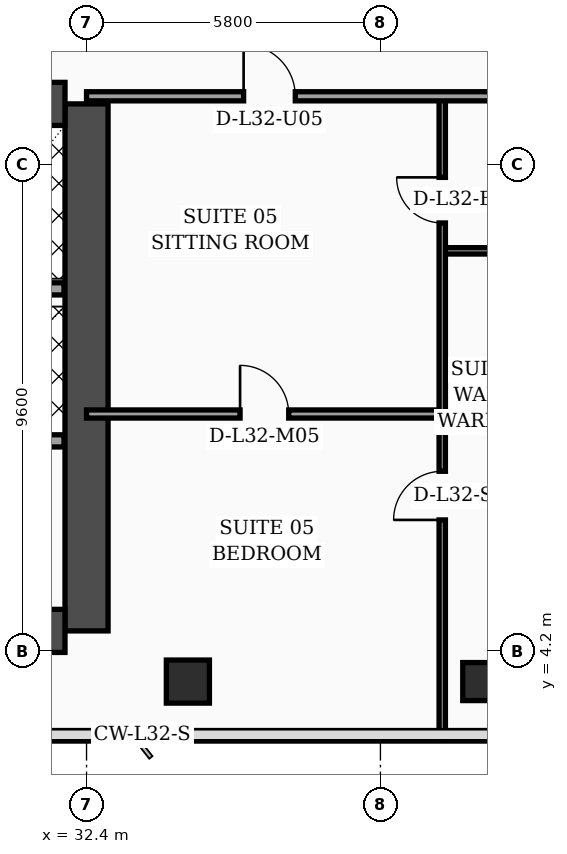
"""IFC4 building model, lengths in metres.
Left out: names, types, materials, properties, quantities, classifications, styles, units other than length and angle.
Written with IfcOpenShell. Run it as: python <this file> out.ifc"""

import sys

from ifc_helpers import new_model, si_unit, direction, frame, frame_2d, origin, origin_2d, place, context, subcontext, project, spatial, rectangle, hollow_rectangle, extrude, element, fill, save


model = new_model("IFC4")
c1 = context("Model", 3, precision=1e-05, world=origin(), true_north=direction((0.0, 1.0)))
c2 = subcontext(c1, "Body", "Model", "MODEL_VIEW")
j1 = project(units=[si_unit("LENGTHUNIT", "METRE"), si_unit("PLANEANGLEUNIT", "RADIAN")], contexts=[c1])
p1 = place(None, origin())
s1 = spatial("IfcSite", under=j1, at=p1, CompositionType="ELEMENT")
p2 = place(p1, origin())
s2 = spatial("IfcBuilding", under=s1, at=p2, CompositionType="ELEMENT")
p3 = place(p2, frame((0.0, 0.0, 131.6)))
s3 = spatial("IfcBuildingStorey", under=s2, at=p3, CompositionType="ELEMENT", Elevation=131.6)
p4 = place(p3, frame((32.4, 4.6, 0.0), z_axis=(0.0, 0.0, 1.0), x_axis=(0.0, 1.0, 0.0)))
e1 = element("IfcWall", 1, at=p4, inside=s3, PredefinedType="SHEAR", context=c2, shape_type="SweptSolid", body=[
    extrude(rectangle(XDim=10.4, YDim=0.85, at=frame_2d((5.2, 0.0))), origin(), (0.0, 0.0, 1.0), 3.56),
])
p5 = place(p3, frame((22.025, 15.0, 0.0), z_axis=(0.0, 0.0, 1.0), x_axis=(1.0, 0.0, 0.0)))
e2 = element("IfcWall", 2, at=p5, inside=s3, PredefinedType="SHEAR", context=c2, shape_type="SweptSolid", body=[
    extrude(rectangle(XDim=9.95, YDim=0.85, at=frame_2d((4.975, 0.0))), origin(), (0.0, 0.0, 1.0), 3.56),
])
p6 = place(p5, frame((4.88, 0.0, 0.0)))
e3 = element("IfcOpeningElement", 3, at=p6, cuts=e2, PredefinedType="OPENING", context=c2, shape_type="SweptSolid", body=[
    extrude(rectangle(XDim=1.1, YDim=2.2, at=frame_2d((0.55, 1.1))), frame((0.0, 0.435, 0.0), z_axis=(0.0, -1.0, 0.0), x_axis=(1.0, 0.0, 0.0)), (0.0, 0.0, 1.0), 0.87),
])
p7 = place(p3, frame((22.025, 4.6, 0.0), z_axis=(0.0, 0.0, 1.0), x_axis=(1.0, 0.0, 0.0)))
e4 = element("IfcWall", 4, at=p7, inside=s3, PredefinedType="SHEAR", context=c2, shape_type="SweptSolid", body=[
    extrude(rectangle(XDim=9.95, YDim=0.85, at=frame_2d((4.975, 0.0))), origin(), (0.0, 0.0, 1.0), 3.56),
])
p8 = place(p3, frame((34.4, 3.6, 0.0), z_axis=(0.0, 0.0, 1.0), x_axis=(1.0, 0.0, 0.0)))
e5 = element("IfcColumn", 5, at=p8, inside=s3, PredefinedType="COLUMN", context=c2, shape_type="SweptSolid", body=[
    extrude(hollow_rectangle(XDim=0.85, YDim=0.85, WallThickness=0.036, at=origin_2d()), origin(), (0.0, 0.0, 1.0), 3.56),
])
p9 = place(p3, frame((40.2, 3.6, 0.0), z_axis=(0.0, 0.0, 1.0), x_axis=(1.0, 0.0, 0.0)))
e6 = element("IfcColumn", 6, at=p9, inside=s3, PredefinedType="COLUMN", context=c2, shape_type="SweptSolid", body=[
    extrude(hollow_rectangle(XDim=0.75, YDim=0.75, WallThickness=0.032, at=origin_2d()), origin(), (0.0, 0.0, 1.0), 3.56),
])
p10 = place(p3, frame((27.02, 11.35, 0.0), z_axis=(0.0, 0.0, 1.0), x_axis=(1.0, 0.0, 0.0)))
e7 = element("IfcWall", 7, at=p10, inside=s3, PredefinedType="SOLIDWALL", context=c2, shape_type="SweptSolid", body=[
    extrude(rectangle(XDim=4.935, YDim=0.24, at=frame_2d((2.468, 0.0))), origin(), (0.0, 0.0, 1.0), 3.56),
])
p11 = place(p10, frame((0.45, 0.0, 0.0)))
e8 = element("IfcOpeningElement", 8, at=p11, cuts=e7, PredefinedType="OPENING", context=c2, shape_type="SweptSolid", body=[
    extrude(rectangle(XDim=1.3, YDim=2.35, at=frame_2d((0.65, 1.175))), frame((0.0, 0.13, 0.0), z_axis=(0.0, -1.0, 0.0), x_axis=(1.0, 0.0, 0.0)), (0.0, 0.0, 1.0), 0.26),
])
p12 = place(p3, frame((27.02, 8.35, 0.0), z_axis=(0.0, 0.0, 1.0), x_axis=(1.0, 0.0, 0.0)))
e9 = element("IfcWall", 9, at=p12, inside=s3, PredefinedType="SOLIDWALL", context=c2, shape_type="SweptSolid", body=[
    extrude(rectangle(XDim=4.935, YDim=0.24, at=frame_2d((2.468, 0.0))), origin(), (0.0, 0.0, 1.0), 3.56),
])
p13 = place(p3, frame((39.42, 12.1, 0.0), z_axis=(0.0, 0.0, 1.0), x_axis=(1.0, 0.0, 0.0)))
e10 = element("IfcWall", 10, at=p13, inside=s3, PredefinedType="PARTITIONING", context=c2, shape_type="SweptSolid", body=[
    extrude(rectangle(XDim=2.13, YDim=0.125, at=frame_2d((1.065, 0.0))), origin(), (0.0, 0.0, 1.0), 3.56),
])
p14 = place(p3, frame((32.4, 8.88, 0.0), z_axis=(0.0, 0.0, 1.0), x_axis=(1.0, 0.0, 0.0)))
e11 = element("IfcWall", 11, at=p14, inside=s3, PredefinedType="PARTITIONING", context=c2, shape_type="SweptSolid", body=[
    extrude(rectangle(XDim=7.02, YDim=0.16, at=frame_2d((3.51, 0.0))), origin(), (0.0, 0.0, 1.0), 2.84),
])
p15 = place(p14, frame((3.03, 0.0, 0.0)))
e12 = element("IfcOpeningElement", 12, at=p15, cuts=e11, PredefinedType="OPENING", context=c2, shape_type="SweptSolid", body=[
    extrude(rectangle(XDim=0.96, YDim=2.2, at=frame_2d((0.48, 1.1))), frame((0.0, 0.09, 0.0), z_axis=(0.0, -1.0, 0.0), x_axis=(1.0, 0.0, 0.0)), (0.0, 0.0, 1.0), 0.18),
])
p16 = place(p3, frame((39.42, 2.44, 0.0), z_axis=(0.0, 0.0, 1.0), x_axis=(0.0, 1.0, 0.0)))
e13 = element("IfcWall", 13, at=p16, inside=s3, PredefinedType="PARTITIONING", context=c2, shape_type="SweptSolid", body=[
    extrude(rectangle(XDim=12.71, YDim=0.125, at=frame_2d((6.355, 0.0))), origin(), (0.0, 0.0, 1.0), 2.84),
])
p17 = place(p16, frame((4.35, 0.0, 0.0)))
e14 = element("IfcOpeningElement", 14, at=p17, cuts=e13, PredefinedType="OPENING", context=c2, shape_type="SweptSolid", body=[
    extrude(rectangle(XDim=0.96, YDim=2.2, at=frame_2d((0.48, 1.1))), frame((0.0, 0.073, 0.0), z_axis=(0.0, -1.0, 0.0), x_axis=(1.0, 0.0, 0.0)), (0.0, 0.0, 1.0), 0.145),
])
p18 = place(p16, frame((10.21, 0.0, 0.0)))
e15 = element("IfcOpeningElement", 15, at=p18, cuts=e13, PredefinedType="OPENING", context=c2, shape_type="SweptSolid", body=[
    extrude(rectangle(XDim=0.9, YDim=2.15, at=frame_2d((0.45, 1.075))), frame((0.0, 0.073, 0.0), z_axis=(0.0, -1.0, 0.0), x_axis=(1.0, 0.0, 0.0)), (0.0, 0.0, 1.0), 0.145),
])
p19 = place(p3, frame((32.4, 15.15, 0.0), z_axis=(0.0, 0.0, 1.0), x_axis=(1.0, 0.0, 0.0)))
e16 = element("IfcWall", 16, at=p19, inside=s3, PredefinedType="PARTITIONING", context=c2, shape_type="SweptSolid", body=[
    extrude(rectangle(XDim=9.15, YDim=0.18, at=frame_2d((4.575, 0.0))), origin(), (0.0, 0.0, 1.0), 2.84),
])
p20 = place(p19, frame((3.1, 0.0, 0.0)))
e17 = element("IfcOpeningElement", 17, at=p20, cuts=e16, PredefinedType="OPENING", context=c2, shape_type="SweptSolid", body=[
    extrude(rectangle(XDim=1.02, YDim=2.2, at=frame_2d((0.51, 1.1))), frame((0.0, 0.1, 0.0), z_axis=(0.0, -1.0, 0.0), x_axis=(1.0, 0.0, 0.0)), (0.0, 0.0, 1.0), 0.2),
])
p21 = place(p15, origin())
e18 = element("IfcDoor", 18, at=p21, inside=s3, OperationType="SINGLE_SWING_LEFT", PredefinedType="DOOR", context=c2, shape_type="SweptSolid", body=[
    extrude(rectangle(XDim=0.96, YDim=2.2, at=frame_2d((0.48, 1.1))), frame((0.0, 0.025, 0.0), z_axis=(0.0, -1.0, 0.0), x_axis=(1.0, 0.0, 0.0)), (0.0, 0.0, 1.0), 0.05),
])
fill(e12, e18)
p22 = place(p17, origin())
e19 = element("IfcDoor", 19, at=p22, inside=s3, OperationType="SINGLE_SWING_LEFT", PredefinedType="DOOR", context=c2, shape_type="SweptSolid", body=[
    extrude(rectangle(XDim=0.96, YDim=2.2, at=frame_2d((0.48, 1.1))), frame((0.0, 0.025, 0.0), z_axis=(0.0, -1.0, 0.0), x_axis=(1.0, 0.0, 0.0)), (0.0, 0.0, 1.0), 0.05),
])
fill(e14, e19)
p23 = place(p18, origin())
e20 = element("IfcDoor", 20, at=p23, inside=s3, OperationType="SINGLE_SWING_RIGHT", PredefinedType="DOOR", context=c2, shape_type="SweptSolid", body=[
    extrude(rectangle(XDim=0.9, YDim=2.15, at=frame_2d((0.45, 1.075))), frame((0.0, 0.025, 0.0), z_axis=(0.0, -1.0, 0.0), x_axis=(1.0, 0.0, 0.0)), (0.0, 0.0, 1.0), 0.05),
])
fill(e15, e20)
p24 = place(p20, origin())
e21 = element("IfcDoor", 21, at=p24, inside=s3, OperationType="SINGLE_SWING_LEFT", PredefinedType="DOOR", context=c2, shape_type="SweptSolid", body=[
    extrude(rectangle(XDim=1.02, YDim=2.2, at=frame_2d((0.51, 1.1))), frame((0.0, 0.025, 0.0), z_axis=(0.0, -1.0, 0.0), x_axis=(1.0, 0.0, 0.0)), (0.0, 0.0, 1.0), 0.05),
])
fill(e17, e21)
save(model, sys.argv[1])
